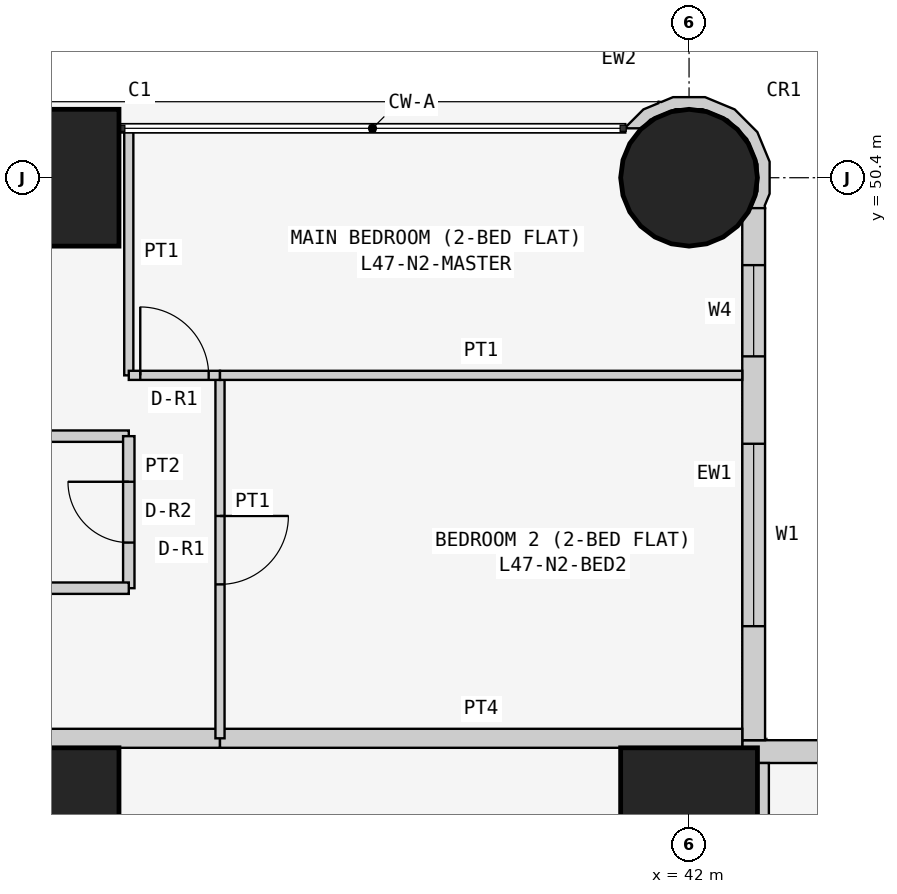
"""IFC4 building model, lengths in metres.
Left out: names, types, materials, properties, quantities, classifications, styles, units other than length and angle.
Written with IfcOpenShell. Run it as: python <this file> out.ifc"""

import sys

from ifc_helpers import new_model, si_unit, direction, frame, frame_2d, origin, origin_2d, place, context, subcontext, project, spatial, polyline, rectangle, circle, outline, extrude, element, fill, save


model = new_model("IFC4")
c1 = context("Model", 3, precision=1e-05, world=origin(), true_north=direction((0.0, 1.0)))
c2 = subcontext(c1, "Body", "Model", "MODEL_VIEW")
j1 = project(units=[si_unit("LENGTHUNIT", "METRE"), si_unit("PLANEANGLEUNIT", "RADIAN")], contexts=[c1])
p1 = place(None, origin())
s1 = spatial("IfcSite", under=j1, at=p1, CompositionType="ELEMENT")
p2 = place(p1, origin())
s2 = spatial("IfcBuilding", under=s1, at=p2, CompositionType="ELEMENT")
p3 = place(p2, frame((0.0, 0.0, 183.3)))
s3 = spatial("IfcBuildingStorey", under=s2, at=p3, CompositionType="ELEMENT", Elevation=183.3)
for number, where, z_axis, x_axis in (
    (1, (33.6, 42.0, 0.0), (0.0, 0.0, 1.0), (1.0, 0.0, 0.0)),
    (2, (33.6, 50.4, 0.0), (0.0, 0.0, 1.0), (1.0, 0.0, 0.0)),
    (3, (42.0, 42.0, 0.0), (0.0, 0.0, 1.0), (1.0, 0.0, 0.0)),
):
    element("IfcColumn", number, at=place(p3, frame(where, z_axis=z_axis, x_axis=x_axis)), inside=s3, PredefinedType="COLUMN", context=c2, shape_type="SweptSolid", body=[
        extrude(rectangle(XDim=1.8, YDim=1.8, at=origin_2d()), origin(), (0.0, 0.0, 1.0), 3.6),
    ])
p4 = place(p3, frame((42.0, 50.4, 0.0), z_axis=(0.0, 0.0, 1.0), x_axis=(1.0, 0.0, 0.0)))
e4 = element("IfcColumn", 4, at=p4, inside=s3, PredefinedType="COLUMN", context=c2, shape_type="SweptSolid", body=[
    extrude(circle(Radius=0.9, at=origin_2d()), origin(), (0.0, 0.0, 1.0), 3.6),
])
p5 = place(p3, frame((50.0, 42.85, 0.0), z_axis=(0.0, 0.0, 1.0), x_axis=(-1.0, 0.0, 0.0)))
e5 = element("IfcWall", 5, at=p5, inside=s3, PredefinedType="SOLIDWALL", context=c2, shape_type="SweptSolid", body=[
    extrude(rectangle(XDim=7.3, YDim=0.3, at=frame_2d((3.65, 0.0))), origin(), (0.0, 0.0, 1.0), 3.45),
])
p6 = place(p5, frame((3.1, 0.0, 0.9)))
e6 = element("IfcOpeningElement", 6, at=p6, cuts=e5, PredefinedType="OPENING", context=c2, shape_type="SweptSolid", body=[
    extrude(rectangle(XDim=2.4, YDim=1.5, at=frame_2d((1.2, 0.75))), frame((0.0, 0.16, 0.0), z_axis=(0.0, -1.0, 0.0), x_axis=(1.0, 0.0, 0.0)), (0.0, 0.0, 1.0), 0.32),
])
p7 = place(p5, frame((0.75, 0.0, 0.9)))
e7 = element("IfcOpeningElement", 7, at=p7, cuts=e5, PredefinedType="OPENING", context=c2, shape_type="SweptSolid", body=[
    extrude(rectangle(XDim=1.2, YDim=1.5, at=frame_2d((0.6, 0.75))), frame((0.0, 0.16, 0.0), z_axis=(0.0, -1.0, 0.0), x_axis=(1.0, 0.0, 0.0)), (0.0, 0.0, 1.0), 0.32),
])
p8 = place(p3, frame((42.85, 43.0, 0.0), z_axis=(0.0, 0.0, 1.0), x_axis=(0.0, 1.0, 0.0)))
e8 = element("IfcWall", 8, at=p8, inside=s3, PredefinedType="SOLIDWALL", context=c2, shape_type="SweptSolid", body=[
    extrude(rectangle(XDim=7.0, YDim=0.3, at=frame_2d((3.5, 0.0))), origin(), (0.0, 0.0, 1.0), 3.45),
])
p9 = place(p8, frame((1.5, 0.0, 0.9)))
e9 = element("IfcOpeningElement", 9, at=p9, cuts=e8, PredefinedType="OPENING", context=c2, shape_type="SweptSolid", body=[
    extrude(rectangle(XDim=2.4, YDim=1.5, at=frame_2d((1.2, 0.75))), frame((0.0, 0.16, 0.0), z_axis=(0.0, -1.0, 0.0), x_axis=(1.0, 0.0, 0.0)), (0.0, 0.0, 1.0), 0.32),
])
p10 = place(p8, frame((5.05, 0.0, 0.9)))
e10 = element("IfcOpeningElement", 10, at=p10, cuts=e8, PredefinedType="OPENING", context=c2, shape_type="SweptSolid", body=[
    extrude(rectangle(XDim=1.2, YDim=1.5, at=frame_2d((0.6, 0.75))), frame((0.0, 0.16, 0.0), z_axis=(0.0, -1.0, 0.0), x_axis=(1.0, 0.0, 0.0)), (0.0, 0.0, 1.0), 0.32),
])
p11 = place(p3, frame((42.91, 50.036, 0.0), z_axis=(0.0, 0.0, 1.0), x_axis=(0.377204953059, 0.926129809145, 0.0)))
e11 = element("IfcWall", 11, at=p11, inside=s3, PredefinedType="SOLIDWALL", context=c2, shape_type="SweptSolid", body=[
    extrude(outline(polyline([(0.769, 1.728), (0.75, 1.723), (0.6, 1.875), (0.295, 2.004), (0.281, 1.998), (0.36, 1.803), (0.509, 1.741), (0.761, 1.486), (0.896, 1.154), (0.894, 0.795), (0.755, 0.465), (0.5, 0.213), (0.168, 0.078), (-0.1, 0.079), (0.001, -0.097), (0.03, -0.08), (0.198, -0.081), (0.589, 0.078), (0.889, 0.374), (1.053, 0.763), (1.055, 1.185), (0.896, 1.575), (0.778, 1.695), (0.769, 1.728)])), origin(), (0.0, 0.0, 1.0), 3.45),
])
p12 = place(p3, frame((29.4, 43.025, 0.0), z_axis=(0.0, 0.0, 1.0), x_axis=(1.0, 0.0, 0.0)))
e12 = element("IfcWall", 12, at=p12, inside=s3, PredefinedType="PARTITIONING", context=c2, shape_type="SweptSolid", body=[
    extrude(rectangle(XDim=6.429, YDim=0.25, at=frame_2d((3.215, 0.0))), origin(), (0.0, 0.0, 1.0), 3.45),
])
p13 = place(p12, frame((0.5, 0.0, 0.0)))
e13 = element("IfcOpeningElement", 13, at=p13, cuts=e12, PredefinedType="OPENING", context=c2, shape_type="SweptSolid", body=[
    extrude(rectangle(XDim=1.0, YDim=2.1, at=frame_2d((0.5, 1.05))), frame((0.0, 0.135, 0.0), z_axis=(0.0, -1.0, 0.0), x_axis=(1.0, 0.0, 0.0)), (0.0, 0.0, 1.0), 0.27),
])
p14 = place(p3, frame((35.829, 43.025, 0.0), z_axis=(0.0, 0.0, 1.0), x_axis=(1.0, 0.0, 0.0)))
e14 = element("IfcWall", 14, at=p14, inside=s3, PredefinedType="PARTITIONING", context=c2, shape_type="SweptSolid", body=[
    extrude(rectangle(XDim=6.871, YDim=0.25, at=frame_2d((3.436, 0.0))), origin(), (0.0, 0.0, 1.0), 3.45),
])
p15 = place(p3, frame((42.975, 42.7, 0.0), z_axis=(0.0, 0.0, 1.0), x_axis=(0.0, -1.0, 0.0)))
e15 = element("IfcWall", 15, at=p15, inside=s3, PredefinedType="PARTITIONING", context=c2, shape_type="SweptSolid", body=[
    extrude(rectangle(XDim=11.557, YDim=0.15, at=frame_2d((5.778, 0.0))), origin(), (0.0, 0.0, 1.0), 3.45),
])
p16 = place(p3, frame((29.4, 47.0, 0.0), z_axis=(0.0, 0.0, 1.0), x_axis=(1.0, 0.0, 0.0)))
e16 = element("IfcWall", 16, at=p16, inside=s3, PredefinedType="PARTITIONING", context=c2, shape_type="SweptSolid", body=[
    extrude(rectangle(XDim=5.229, YDim=0.15, at=frame_2d((2.615, 0.0))), origin(), (0.0, 0.0, 1.0), 3.45),
])
p17 = place(p3, frame((34.629, 47.0, 0.0), z_axis=(0.0, 0.0, 1.0), x_axis=(0.0, -1.0, 0.0)))
e17 = element("IfcWall", 17, at=p17, inside=s3, PredefinedType="PARTITIONING", context=c2, shape_type="SweptSolid", body=[
    extrude(rectangle(XDim=2.0, YDim=0.15, at=frame_2d((1.0, 0.0))), origin(), (0.0, 0.0, 1.0), 3.45),
])
p18 = place(p17, frame((0.6, 0.0, 0.0)))
e18 = element("IfcOpeningElement", 18, at=p18, cuts=e17, PredefinedType="OPENING", context=c2, shape_type="SweptSolid", body=[
    extrude(rectangle(XDim=0.8, YDim=2.1, at=frame_2d((0.4, 1.05))), frame((0.0, 0.085, 0.0), z_axis=(0.0, -1.0, 0.0), x_axis=(1.0, 0.0, 0.0)), (0.0, 0.0, 1.0), 0.17),
])
p19 = place(p3, frame((34.629, 45.0, 0.0), z_axis=(0.0, 0.0, 1.0), x_axis=(-1.0, 0.0, 0.0)))
e19 = element("IfcWall", 19, at=p19, inside=s3, PredefinedType="PARTITIONING", context=c2, shape_type="SweptSolid", body=[
    extrude(rectangle(XDim=5.229, YDim=0.15, at=frame_2d((2.615, 0.0))), origin(), (0.0, 0.0, 1.0), 3.45),
])
p20 = place(p3, frame((35.829, 47.8, 0.0), z_axis=(0.0, 0.0, 1.0), x_axis=(0.0, -1.0, 0.0)))
e20 = element("IfcWall", 20, at=p20, inside=s3, PredefinedType="PARTITIONING", context=c2, shape_type="SweptSolid", body=[
    extrude(rectangle(XDim=4.775, YDim=0.12, at=frame_2d((2.388, 0.0))), origin(), (0.0, 0.0, 1.0), 3.45),
])
p21 = place(p20, frame((1.85, 0.0, 0.0)))
e21 = element("IfcOpeningElement", 21, at=p21, cuts=e20, PredefinedType="OPENING", context=c2, shape_type="SweptSolid", body=[
    extrude(rectangle(XDim=0.9, YDim=2.1, at=frame_2d((0.45, 1.05))), frame((0.0, 0.07, 0.0), z_axis=(0.0, -1.0, 0.0), x_axis=(1.0, 0.0, 0.0)), (0.0, 0.0, 1.0), 0.14),
])
p22 = place(p3, frame((34.629, 51.05, 0.0), z_axis=(0.0, 0.0, 1.0), x_axis=(0.0, -1.0, 0.0)))
e22 = element("IfcWall", 22, at=p22, inside=s3, PredefinedType="PARTITIONING", context=c2, shape_type="SweptSolid", body=[
    extrude(rectangle(XDim=3.25, YDim=0.12, at=frame_2d((1.625, 0.0))), origin(), (0.0, 0.0, 1.0), 3.45),
])
p23 = place(p3, frame((34.629, 47.8, 0.0), z_axis=(0.0, 0.0, 1.0), x_axis=(1.0, 0.0, 0.0)))
e23 = element("IfcWall", 23, at=p23, inside=s3, PredefinedType="PARTITIONING", context=c2, shape_type="SweptSolid", body=[
    extrude(rectangle(XDim=1.2, YDim=0.12, at=frame_2d((0.6, 0.0))), origin(), (0.0, 0.0, 1.0), 3.45),
])
p24 = place(p23, frame((0.151, 0.0, 0.0)))
e24 = element("IfcOpeningElement", 24, at=p24, cuts=e23, PredefinedType="OPENING", context=c2, shape_type="SweptSolid", body=[
    extrude(rectangle(XDim=0.9, YDim=2.1, at=frame_2d((0.45, 1.05))), frame((0.0, 0.07, 0.0), z_axis=(0.0, -1.0, 0.0), x_axis=(1.0, 0.0, 0.0)), (0.0, 0.0, 1.0), 0.14),
])
p25 = place(p3, frame((35.829, 47.8, 0.0), z_axis=(0.0, 0.0, 1.0), x_axis=(1.0, 0.0, 0.0)))
e25 = element("IfcWall", 25, at=p25, inside=s3, PredefinedType="PARTITIONING", context=c2, shape_type="SweptSolid", body=[
    extrude(rectangle(XDim=6.871, YDim=0.12, at=frame_2d((3.436, 0.0))), origin(), (0.0, 0.0, 1.0), 3.45),
])
p26 = place(p9, origin())
e26 = element("IfcWindow", 26, at=p26, inside=s3, PartitioningType="SINGLE_PANEL", PredefinedType="WINDOW", context=c2, shape_type="SweptSolid", body=[
    extrude(rectangle(XDim=2.4, YDim=1.5, at=frame_2d((1.2, 0.75))), frame((0.0, 0.03, 0.0), z_axis=(0.0, -1.0, 0.0), x_axis=(1.0, 0.0, 0.0)), (0.0, 0.0, 1.0), 0.06),
])
fill(e9, e26)
p27 = place(p10, origin())
e27 = element("IfcWindow", 27, at=p27, inside=s3, PartitioningType="SINGLE_PANEL", PredefinedType="WINDOW", context=c2, shape_type="SweptSolid", body=[
    extrude(rectangle(XDim=1.2, YDim=1.5, at=frame_2d((0.6, 0.75))), frame((0.0, 0.03, 0.0), z_axis=(0.0, -1.0, 0.0), x_axis=(1.0, 0.0, 0.0)), (0.0, 0.0, 1.0), 0.06),
])
fill(e10, e27)
p28 = place(p18, frame((0.8, 0.0, 0.0), z_axis=(0.0, 0.0, 1.0), x_axis=(-1.0, 0.0, 0.0)))
e28 = element("IfcDoor", 28, at=p28, inside=s3, OperationType="SINGLE_SWING_RIGHT", PredefinedType="DOOR", context=c2, shape_type="SweptSolid", body=[
    extrude(rectangle(XDim=0.8, YDim=2.1, at=frame_2d((0.4, 1.05))), frame((0.0, 0.025, 0.0), z_axis=(0.0, -1.0, 0.0), x_axis=(1.0, 0.0, 0.0)), (0.0, 0.0, 1.0), 0.05),
])
fill(e18, e28)
p29 = place(p21, origin())
e29 = element("IfcDoor", 29, at=p29, inside=s3, OperationType="SINGLE_SWING_LEFT", PredefinedType="DOOR", context=c2, shape_type="SweptSolid", body=[
    extrude(rectangle(XDim=0.9, YDim=2.1, at=frame_2d((0.45, 1.05))), frame((0.0, 0.025, 0.0), z_axis=(0.0, -1.0, 0.0), x_axis=(1.0, 0.0, 0.0)), (0.0, 0.0, 1.0), 0.05),
])
fill(e21, e29)
p30 = place(p24, origin())
e30 = element("IfcDoor", 30, at=p30, inside=s3, OperationType="SINGLE_SWING_LEFT", PredefinedType="DOOR", context=c2, shape_type="SweptSolid", body=[
    extrude(rectangle(XDim=0.9, YDim=2.1, at=frame_2d((0.45, 1.05))), frame((0.0, 0.025, 0.0), z_axis=(0.0, -1.0, 0.0), x_axis=(1.0, 0.0, 0.0)), (0.0, 0.0, 1.0), 0.05),
])
fill(e24, e30)
save(model, sys.argv[1])
